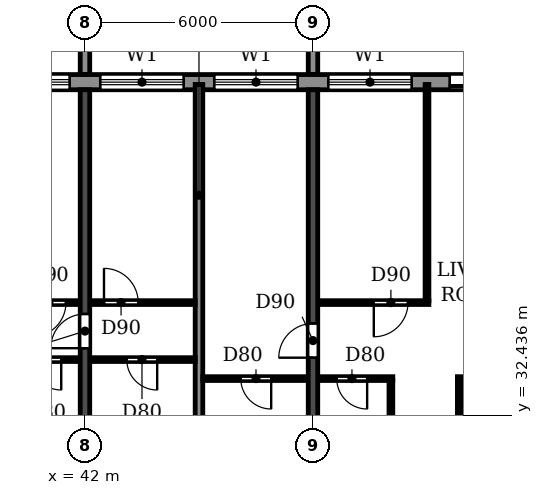
"""IFC4 building model, lengths in metres.
Left out: names, types, materials, properties, quantities, classifications, styles, units other than length and angle.
Written with IfcOpenShell. Run it as: python <this file> out.ifc"""

import sys

from ifc_helpers import new_model, si_unit, direction, frame, frame_2d, origin, place, context, subcontext, project, spatial, polyline, rectangle, outline, extrude, source, transform, mapped, element, fill, save


model = new_model("IFC4")
c1 = context("Model", 3, precision=1e-05, world=origin(), true_north=direction((0.0, 1.0)))
c2 = subcontext(c1, "Body", "Model", "MODEL_VIEW")
j1 = project(units=[si_unit("LENGTHUNIT", "METRE"), si_unit("PLANEANGLEUNIT", "RADIAN")], contexts=[c1])
p1 = place(None, origin())
s1 = spatial("IfcSite", under=j1, at=p1, CompositionType="ELEMENT")
p2 = place(p1, origin())
s2 = spatial("IfcBuilding", under=s1, at=p2, CompositionType="ELEMENT")
p3 = place(p2, frame((0.0, 0.0, 241.2)))
s3 = spatial("IfcBuildingStorey", under=s2, at=p3, CompositionType="ELEMENT", Elevation=241.2)
p4 = place(p3, frame((42.0, 30.5, 0.0), z_axis=(0.0, 0.0, 1.0), x_axis=(0.0, 1.0, 0.0)))
e1 = element("IfcWall", 1, at=p4, inside=s3, PredefinedType="SHEAR", context=c2, shape_type="SweptSolid", body=[
    extrude(rectangle(XDim=10.5, YDim=0.25, at=frame_2d((5.25, 0.0))), origin(), (0.0, 0.0, 1.0), 3.08),
])
p5 = place(p4, frame((3.7, 0.0, 0.0)))
e2 = element("IfcOpeningElement", 2, at=p5, cuts=e1, PredefinedType="OPENING", context=c2, shape_type="SweptSolid", body=[
    extrude(rectangle(XDim=0.9, YDim=2.1, at=frame_2d((0.45, 1.05))), frame((0.0, 0.135, 0.0), z_axis=(0.0, -1.0, 0.0), x_axis=(1.0, 0.0, 0.0)), (0.0, 0.0, 1.0), 0.27),
])
p6 = place(p3, frame((48.0, 30.5, 0.0), z_axis=(0.0, 0.0, 1.0), x_axis=(0.0, 1.0, 0.0)))
e3 = element("IfcWall", 3, at=p6, inside=s3, PredefinedType="SHEAR", context=c2, shape_type="SweptSolid", body=[
    extrude(rectangle(XDim=10.5, YDim=0.25, at=frame_2d((5.25, 0.0))), origin(), (0.0, 0.0, 1.0), 3.08),
])
p7 = place(p6, frame((3.45, 0.0, 0.0)))
e4 = element("IfcOpeningElement", 4, at=p7, cuts=e3, PredefinedType="OPENING", context=c2, shape_type="SweptSolid", body=[
    extrude(rectangle(XDim=0.9, YDim=2.1, at=frame_2d((0.45, 1.05))), frame((0.0, 0.135, 0.0), z_axis=(0.0, -1.0, 0.0), x_axis=(1.0, 0.0, 0.0)), (0.0, 0.0, 1.0), 0.27),
])
p8 = place(p3, frame((79.317, 41.2, 0.0), z_axis=(0.0, 0.0, 1.0), x_axis=(-1.0, 0.0, 0.0)))
e5 = element("IfcWall", 5, at=p8, inside=s3, PredefinedType="STANDARD", context=c2, shape_type="SweptSolid", body=[
    extrude(rectangle(XDim=56.634, YDim=0.4, at=frame_2d((28.317, 0.0))), origin(), (0.0, 0.0, 1.0), 3.08),
])
p9 = place(p8, frame((52.917, 0.0, 0.0)))
e6 = element("IfcOpeningElement", 6, at=p9, cuts=e5, PredefinedType="OPENING", context=c2, shape_type="SweptSolid", body=[
    extrude(rectangle(XDim=1.8, YDim=2.4, at=frame_2d((0.9, 1.2))), frame((0.0, 0.21, 0.0), z_axis=(0.0, -1.0, 0.0), x_axis=(1.0, 0.0, 0.0)), (0.0, 0.0, 1.0), 0.42),
])
p10 = place(p8, frame((49.717, 0.0, 0.9)))
e7 = element("IfcOpeningElement", 7, at=p10, cuts=e5, PredefinedType="OPENING", context=c2, shape_type="SweptSolid", body=[
    extrude(rectangle(XDim=2.2, YDim=1.5, at=frame_2d((1.1, 0.75))), frame((0.0, 0.21, 0.0), z_axis=(0.0, -1.0, 0.0), x_axis=(1.0, 0.0, 0.0)), (0.0, 0.0, 1.0), 0.42),
])
p11 = place(p8, frame((46.717, 0.0, 0.9)))
e8 = element("IfcOpeningElement", 8, at=p11, cuts=e5, PredefinedType="OPENING", context=c2, shape_type="SweptSolid", body=[
    extrude(rectangle(XDim=2.2, YDim=1.5, at=frame_2d((1.1, 0.75))), frame((0.0, 0.21, 0.0), z_axis=(0.0, -1.0, 0.0), x_axis=(1.0, 0.0, 0.0)), (0.0, 0.0, 1.0), 0.42),
])
p12 = place(p8, frame((43.717, 0.0, 0.9)))
e9 = element("IfcOpeningElement", 9, at=p12, cuts=e5, PredefinedType="OPENING", context=c2, shape_type="SweptSolid", body=[
    extrude(rectangle(XDim=2.2, YDim=1.5, at=frame_2d((1.1, 0.75))), frame((0.0, 0.21, 0.0), z_axis=(0.0, -1.0, 0.0), x_axis=(1.0, 0.0, 0.0)), (0.0, 0.0, 1.0), 0.42),
])
p13 = place(p8, frame((40.917, 0.0, 0.0)))
e10 = element("IfcOpeningElement", 10, at=p13, cuts=e5, PredefinedType="OPENING", context=c2, shape_type="SweptSolid", body=[
    extrude(rectangle(XDim=1.8, YDim=2.4, at=frame_2d((0.9, 1.2))), frame((0.0, 0.21, 0.0), z_axis=(0.0, -1.0, 0.0), x_axis=(1.0, 0.0, 0.0)), (0.0, 0.0, 1.0), 0.42),
])
p14 = place(p8, frame((37.717, 0.0, 0.9)))
e11 = element("IfcOpeningElement", 11, at=p14, cuts=e5, PredefinedType="OPENING", context=c2, shape_type="SweptSolid", body=[
    extrude(rectangle(XDim=2.2, YDim=1.5, at=frame_2d((1.1, 0.75))), frame((0.0, 0.21, 0.0), z_axis=(0.0, -1.0, 0.0), x_axis=(1.0, 0.0, 0.0)), (0.0, 0.0, 1.0), 0.42),
])
p15 = place(p8, frame((34.717, 0.0, 0.9)))
e12 = element("IfcOpeningElement", 12, at=p15, cuts=e5, PredefinedType="OPENING", context=c2, shape_type="SweptSolid", body=[
    extrude(rectangle(XDim=2.2, YDim=1.5, at=frame_2d((1.1, 0.75))), frame((0.0, 0.21, 0.0), z_axis=(0.0, -1.0, 0.0), x_axis=(1.0, 0.0, 0.0)), (0.0, 0.0, 1.0), 0.42),
])
p16 = place(p8, frame((31.717, 0.0, 0.9)))
e13 = element("IfcOpeningElement", 13, at=p16, cuts=e5, PredefinedType="OPENING", context=c2, shape_type="SweptSolid", body=[
    extrude(rectangle(XDim=2.2, YDim=1.5, at=frame_2d((1.1, 0.75))), frame((0.0, 0.21, 0.0), z_axis=(0.0, -1.0, 0.0), x_axis=(1.0, 0.0, 0.0)), (0.0, 0.0, 1.0), 0.42),
])
p17 = place(p8, frame((28.717, 0.0, 0.9)))
e14 = element("IfcOpeningElement", 14, at=p17, cuts=e5, PredefinedType="OPENING", context=c2, shape_type="SweptSolid", body=[
    extrude(rectangle(XDim=2.2, YDim=1.5, at=frame_2d((1.1, 0.75))), frame((0.0, 0.21, 0.0), z_axis=(0.0, -1.0, 0.0), x_axis=(1.0, 0.0, 0.0)), (0.0, 0.0, 1.0), 0.42),
])
p18 = place(p8, frame((25.917, 0.0, 0.0)))
e15 = element("IfcOpeningElement", 15, at=p18, cuts=e5, PredefinedType="OPENING", context=c2, shape_type="SweptSolid", body=[
    extrude(rectangle(XDim=1.8, YDim=2.4, at=frame_2d((0.9, 1.2))), frame((0.0, 0.21, 0.0), z_axis=(0.0, -1.0, 0.0), x_axis=(1.0, 0.0, 0.0)), (0.0, 0.0, 1.0), 0.42),
])
p19 = place(p8, frame((22.717, 0.0, 0.9)))
e16 = element("IfcOpeningElement", 16, at=p19, cuts=e5, PredefinedType="OPENING", context=c2, shape_type="SweptSolid", body=[
    extrude(rectangle(XDim=2.2, YDim=1.5, at=frame_2d((1.1, 0.75))), frame((0.0, 0.21, 0.0), z_axis=(0.0, -1.0, 0.0), x_axis=(1.0, 0.0, 0.0)), (0.0, 0.0, 1.0), 0.42),
])
p20 = place(p8, frame((19.717, 0.0, 0.9)))
e17 = element("IfcOpeningElement", 17, at=p20, cuts=e5, PredefinedType="OPENING", context=c2, shape_type="SweptSolid", body=[
    extrude(rectangle(XDim=2.2, YDim=1.5, at=frame_2d((1.1, 0.75))), frame((0.0, 0.21, 0.0), z_axis=(0.0, -1.0, 0.0), x_axis=(1.0, 0.0, 0.0)), (0.0, 0.0, 1.0), 0.42),
])
p21 = place(p8, frame((16.717, 0.0, 0.9)))
e18 = element("IfcOpeningElement", 18, at=p21, cuts=e5, PredefinedType="OPENING", context=c2, shape_type="SweptSolid", body=[
    extrude(rectangle(XDim=2.2, YDim=1.5, at=frame_2d((1.1, 0.75))), frame((0.0, 0.21, 0.0), z_axis=(0.0, -1.0, 0.0), x_axis=(1.0, 0.0, 0.0)), (0.0, 0.0, 1.0), 0.42),
])
p22 = place(p8, frame((13.917, 0.0, 0.0)))
e19 = element("IfcOpeningElement", 19, at=p22, cuts=e5, PredefinedType="OPENING", context=c2, shape_type="SweptSolid", body=[
    extrude(rectangle(XDim=1.8, YDim=2.4, at=frame_2d((0.9, 1.2))), frame((0.0, 0.21, 0.0), z_axis=(0.0, -1.0, 0.0), x_axis=(1.0, 0.0, 0.0)), (0.0, 0.0, 1.0), 0.42),
])
p23 = place(p8, frame((10.717, 0.0, 0.9)))
e20 = element("IfcOpeningElement", 20, at=p23, cuts=e5, PredefinedType="OPENING", context=c2, shape_type="SweptSolid", body=[
    extrude(rectangle(XDim=2.2, YDim=1.5, at=frame_2d((1.1, 0.75))), frame((0.0, 0.21, 0.0), z_axis=(0.0, -1.0, 0.0), x_axis=(1.0, 0.0, 0.0)), (0.0, 0.0, 1.0), 0.42),
])
p24 = place(p8, frame((7.917, 0.0, 0.0)))
e21 = element("IfcOpeningElement", 21, at=p24, cuts=e5, PredefinedType="OPENING", context=c2, shape_type="SweptSolid", body=[
    extrude(rectangle(XDim=1.8, YDim=2.4, at=frame_2d((0.9, 1.2))), frame((0.0, 0.21, 0.0), z_axis=(0.0, -1.0, 0.0), x_axis=(1.0, 0.0, 0.0)), (0.0, 0.0, 1.0), 0.42),
])
p25 = place(p8, frame((4.717, 0.0, 0.9)))
e22 = element("IfcOpeningElement", 22, at=p25, cuts=e5, PredefinedType="OPENING", context=c2, shape_type="SweptSolid", body=[
    extrude(rectangle(XDim=2.2, YDim=1.5, at=frame_2d((1.1, 0.75))), frame((0.0, 0.21, 0.0), z_axis=(0.0, -1.0, 0.0), x_axis=(1.0, 0.0, 0.0)), (0.0, 0.0, 1.0), 0.42),
])
p26 = place(p8, frame((1.917, 0.0, 0.0)))
e23 = element("IfcOpeningElement", 23, at=p26, cuts=e5, PredefinedType="OPENING", context=c2, shape_type="SweptSolid", body=[
    extrude(rectangle(XDim=1.8, YDim=2.4, at=frame_2d((0.9, 1.2))), frame((0.0, 0.21, 0.0), z_axis=(0.0, -1.0, 0.0), x_axis=(1.0, 0.0, 0.0)), (0.0, 0.0, 1.0), 0.42),
])
m1 = source(origin(), c2, "Body", "SweptSolid", [
    extrude(outline(polyline([(0.0, 0.0), (0.25, 0.0), (0.25, 3.1), (0.0, 3.1), (0.0, 0.0)])), origin(), (0.0, 0.0, 1.0), 3.1),
])
for number, where in (
    (24, (41.875, 41.4, 0.0)),
    (25, (47.875, 41.4, 0.0)),
):
    element("IfcWall", number, at=place(p3, frame(where)), inside=s3, PredefinedType="STANDARD", context=c2, shape_type="MappedRepresentation", body=[
        mapped(m1, transform((0.0, 0.0, 0.0))),
    ])
p27 = place(p3, frame((45.0, 30.51, 0.0), z_axis=(0.0, 0.0, 1.0), x_axis=(0.0, 1.0, 0.0)))
e26 = element("IfcWall", 26, at=p27, inside=s3, PredefinedType="PARTITIONING", context=c2, shape_type="SweptSolid", body=[
    extrude(rectangle(XDim=10.63, YDim=0.2, at=frame_2d((5.315, 0.0))), origin(), (0.0, 0.0, 1.0), 3.08),
])
p28 = place(p3, frame((45.1, 33.4, 0.0), z_axis=(0.0, 0.0, 1.0), x_axis=(1.0, 0.0, 0.0)))
e27 = element("IfcWall", 27, at=p28, inside=s3, PredefinedType="PARTITIONING", context=c2, shape_type="SweptSolid", body=[
    extrude(rectangle(XDim=2.765, YDim=0.1, at=frame_2d((1.382, 0.0))), origin(), (0.0, 0.0, 1.0), 3.08),
])
p29 = place(p28, frame((1.0, 0.0, 0.0)))
e28 = element("IfcOpeningElement", 28, at=p29, cuts=e27, PredefinedType="OPENING", context=c2, shape_type="SweptSolid", body=[
    extrude(rectangle(XDim=0.8, YDim=2.1, at=frame_2d((0.4, 1.05))), frame((0.0, 0.06, 0.0), z_axis=(0.0, -1.0, 0.0), x_axis=(1.0, 0.0, 0.0)), (0.0, 0.0, 1.0), 0.12),
])
p30 = place(p3, frame((48.135, 33.4, 0.0), z_axis=(0.0, 0.0, 1.0), x_axis=(1.0, 0.0, 0.0)))
e29 = element("IfcWall", 29, at=p30, inside=s3, PredefinedType="PARTITIONING", context=c2, shape_type="SweptSolid", body=[
    extrude(rectangle(XDim=1.965, YDim=0.1, at=frame_2d((0.982, 0.0))), origin(), (0.0, 0.0, 1.0), 3.08),
])
p31 = place(p30, frame((0.49, 0.0, 0.0)))
e30 = element("IfcOpeningElement", 30, at=p31, cuts=e29, PredefinedType="OPENING", context=c2, shape_type="SweptSolid", body=[
    extrude(rectangle(XDim=0.8, YDim=2.1, at=frame_2d((0.4, 1.05))), frame((0.0, 0.06, 0.0), z_axis=(0.0, -1.0, 0.0), x_axis=(1.0, 0.0, 0.0)), (0.0, 0.0, 1.0), 0.12),
])
p32 = place(p3, frame((51.8, 33.4, 0.0), z_axis=(0.0, 0.0, 1.0), x_axis=(1.0, 0.0, 0.0)))
e31 = element("IfcWall", 31, at=p32, inside=s3, PredefinedType="PARTITIONING", context=c2, shape_type="SweptSolid", body=[
    extrude(rectangle(XDim=2.065, YDim=0.1, at=frame_2d((1.032, 0.0))), origin(), (0.0, 0.0, 1.0), 3.08),
])
p33 = place(p32, frame((0.675, 0.0, 0.0)))
e32 = element("IfcOpeningElement", 32, at=p33, cuts=e31, PredefinedType="OPENING", context=c2, shape_type="SweptSolid", body=[
    extrude(rectangle(XDim=0.9, YDim=2.1, at=frame_2d((0.45, 1.05))), frame((0.0, 0.06, 0.0), z_axis=(0.0, -1.0, 0.0), x_axis=(1.0, 0.0, 0.0)), (0.0, 0.0, 1.0), 0.12),
])
p34 = place(p3, frame((39.9, 33.9, 0.0), z_axis=(0.0, 0.0, 1.0), x_axis=(1.0, 0.0, 0.0)))
e33 = element("IfcWall", 33, at=p34, inside=s3, PredefinedType="PARTITIONING", context=c2, shape_type="SweptSolid", body=[
    extrude(rectangle(XDim=1.965, YDim=0.1, at=frame_2d((0.982, 0.0))), origin(), (0.0, 0.0, 1.0), 3.08),
])
p35 = place(p34, frame((0.675, 0.0, 0.0)))
e34 = element("IfcOpeningElement", 34, at=p35, cuts=e33, PredefinedType="OPENING", context=c2, shape_type="SweptSolid", body=[
    extrude(rectangle(XDim=0.8, YDim=2.1, at=frame_2d((0.4, 1.05))), frame((0.0, 0.06, 0.0), z_axis=(0.0, -1.0, 0.0), x_axis=(1.0, 0.0, 0.0)), (0.0, 0.0, 1.0), 0.12),
])
p36 = place(p3, frame((42.135, 33.9, 0.0), z_axis=(0.0, 0.0, 1.0), x_axis=(1.0, 0.0, 0.0)))
e35 = element("IfcWall", 35, at=p36, inside=s3, PredefinedType="PARTITIONING", context=c2, shape_type="SweptSolid", body=[
    extrude(rectangle(XDim=2.765, YDim=0.1, at=frame_2d((1.382, 0.0))), origin(), (0.0, 0.0, 1.0), 3.08),
])
p37 = place(p36, frame((0.965, 0.0, 0.0)))
e36 = element("IfcOpeningElement", 36, at=p37, cuts=e35, PredefinedType="OPENING", context=c2, shape_type="SweptSolid", body=[
    extrude(rectangle(XDim=0.8, YDim=2.1, at=frame_2d((0.4, 1.05))), frame((0.0, 0.06, 0.0), z_axis=(0.0, -1.0, 0.0), x_axis=(1.0, 0.0, 0.0)), (0.0, 0.0, 1.0), 0.12),
])
p38 = place(p3, frame((38.95, 35.4, 0.0), z_axis=(0.0, 0.0, 1.0), x_axis=(1.0, 0.0, 0.0)))
e37 = element("IfcWall", 37, at=p38, inside=s3, PredefinedType="PARTITIONING", context=c2, shape_type="SweptSolid", body=[
    extrude(rectangle(XDim=2.915, YDim=0.1, at=frame_2d((1.458, 0.0))), origin(), (0.0, 0.0, 1.0), 3.08),
])
p39 = place(p38, frame((1.65, 0.0, 0.0)))
e38 = element("IfcOpeningElement", 38, at=p39, cuts=e37, PredefinedType="OPENING", context=c2, shape_type="SweptSolid", body=[
    extrude(rectangle(XDim=0.9, YDim=2.1, at=frame_2d((0.45, 1.05))), frame((0.0, 0.06, 0.0), z_axis=(0.0, -1.0, 0.0), x_axis=(1.0, 0.0, 0.0)), (0.0, 0.0, 1.0), 0.12),
])
p40 = place(p3, frame((42.135, 35.4, 0.0), z_axis=(0.0, 0.0, 1.0), x_axis=(1.0, 0.0, 0.0)))
e39 = element("IfcWall", 39, at=p40, inside=s3, PredefinedType="PARTITIONING", context=c2, shape_type="SweptSolid", body=[
    extrude(rectangle(XDim=2.765, YDim=0.1, at=frame_2d((1.382, 0.0))), origin(), (0.0, 0.0, 1.0), 3.08),
])
p41 = place(p40, frame((0.365, 0.0, 0.0)))
e40 = element("IfcOpeningElement", 40, at=p41, cuts=e39, PredefinedType="OPENING", context=c2, shape_type="SweptSolid", body=[
    extrude(rectangle(XDim=0.9, YDim=2.1, at=frame_2d((0.45, 1.05))), frame((0.0, 0.06, 0.0), z_axis=(0.0, -1.0, 0.0), x_axis=(1.0, 0.0, 0.0)), (0.0, 0.0, 1.0), 0.12),
])
p42 = place(p3, frame((48.135, 35.4, 0.0), z_axis=(0.0, 0.0, 1.0), x_axis=(1.0, 0.0, 0.0)))
e41 = element("IfcWall", 41, at=p42, inside=s3, PredefinedType="PARTITIONING", context=c2, shape_type="SweptSolid", body=[
    extrude(rectangle(XDim=2.915, YDim=0.1, at=frame_2d((1.458, 0.0))), origin(), (0.0, 0.0, 1.0), 3.08),
])
p43 = place(p42, frame((1.465, 0.0, 0.0)))
e42 = element("IfcOpeningElement", 42, at=p43, cuts=e41, PredefinedType="OPENING", context=c2, shape_type="SweptSolid", body=[
    extrude(rectangle(XDim=0.9, YDim=2.1, at=frame_2d((0.45, 1.05))), frame((0.0, 0.06, 0.0), z_axis=(0.0, -1.0, 0.0), x_axis=(1.0, 0.0, 0.0)), (0.0, 0.0, 1.0), 0.12),
])
p44 = place(p3, frame((50.05, 30.51, 0.0), z_axis=(0.0, 0.0, 1.0), x_axis=(0.0, 1.0, 0.0)))
e43 = element("IfcWall", 43, at=p44, inside=s3, PredefinedType="PARTITIONING", context=c2, shape_type="SweptSolid", body=[
    extrude(rectangle(XDim=2.84, YDim=0.1, at=frame_2d((1.42, 0.0))), origin(), (0.0, 0.0, 1.0), 3.08),
])
p45 = place(p3, frame((51.0, 35.45, 0.0), z_axis=(0.0, 0.0, 1.0), x_axis=(0.0, 1.0, 0.0)))
e44 = element("IfcWall", 44, at=p45, inside=s3, PredefinedType="PARTITIONING", context=c2, shape_type="SweptSolid", body=[
    extrude(rectangle(XDim=5.69, YDim=0.1, at=frame_2d((2.845, 0.0))), origin(), (0.0, 0.0, 1.0), 3.08),
])
p46 = place(p3, frame((51.85, 30.51, 0.0), z_axis=(0.0, 0.0, 1.0), x_axis=(0.0, 1.0, 0.0)))
e45 = element("IfcWall", 45, at=p46, inside=s3, PredefinedType="PARTITIONING", context=c2, shape_type="SweptSolid", body=[
    extrude(rectangle(XDim=2.84, YDim=0.1, at=frame_2d((1.42, 0.0))), origin(), (0.0, 0.0, 1.0), 3.08),
])
p47 = place(p14, origin())
e46 = element("IfcWindow", 46, at=p47, inside=s3, PartitioningType="DOUBLE_PANEL_HORIZONTAL", PredefinedType="WINDOW", context=c2, shape_type="SweptSolid", body=[
    extrude(rectangle(XDim=2.2, YDim=1.5, at=frame_2d((1.1, 0.75))), frame((0.0, 0.03, 0.0), z_axis=(0.0, -1.0, 0.0), x_axis=(1.0, 0.0, 0.0)), (0.0, 0.0, 1.0), 0.06),
])
fill(e11, e46)
p48 = place(p15, origin())
e47 = element("IfcWindow", 47, at=p48, inside=s3, PartitioningType="DOUBLE_PANEL_HORIZONTAL", PredefinedType="WINDOW", context=c2, shape_type="SweptSolid", body=[
    extrude(rectangle(XDim=2.2, YDim=1.5, at=frame_2d((1.1, 0.75))), frame((0.0, 0.03, 0.0), z_axis=(0.0, -1.0, 0.0), x_axis=(1.0, 0.0, 0.0)), (0.0, 0.0, 1.0), 0.06),
])
fill(e12, e47)
p49 = place(p16, origin())
e48 = element("IfcWindow", 48, at=p49, inside=s3, PartitioningType="DOUBLE_PANEL_HORIZONTAL", PredefinedType="WINDOW", context=c2, shape_type="SweptSolid", body=[
    extrude(rectangle(XDim=2.2, YDim=1.5, at=frame_2d((1.1, 0.75))), frame((0.0, 0.03, 0.0), z_axis=(0.0, -1.0, 0.0), x_axis=(1.0, 0.0, 0.0)), (0.0, 0.0, 1.0), 0.06),
])
fill(e13, e48)
p50 = place(p17, origin())
e49 = element("IfcWindow", 49, at=p50, inside=s3, PartitioningType="DOUBLE_PANEL_HORIZONTAL", PredefinedType="WINDOW", context=c2, shape_type="SweptSolid", body=[
    extrude(rectangle(XDim=2.2, YDim=1.5, at=frame_2d((1.1, 0.75))), frame((0.0, 0.03, 0.0), z_axis=(0.0, -1.0, 0.0), x_axis=(1.0, 0.0, 0.0)), (0.0, 0.0, 1.0), 0.06),
])
fill(e14, e49)
p51 = place(p18, origin())
e50 = element("IfcDoor", 50, at=p51, inside=s3, OperationType="DOUBLE_DOOR_SLIDING", PredefinedType="DOOR", context=c2, shape_type="SweptSolid", body=[
    extrude(rectangle(XDim=1.8, YDim=2.4, at=frame_2d((0.9, 1.2))), frame((0.0, 0.025, 0.0), z_axis=(0.0, -1.0, 0.0), x_axis=(1.0, 0.0, 0.0)), (0.0, 0.0, 1.0), 0.05),
])
fill(e15, e50)
p52 = place(p41, origin())
e51 = element("IfcDoor", 51, at=p52, inside=s3, OperationType="SINGLE_SWING_LEFT", PredefinedType="DOOR", context=c2, shape_type="SweptSolid", body=[
    extrude(rectangle(XDim=0.9, YDim=2.1, at=frame_2d((0.45, 1.05))), frame((0.0, 0.025, 0.0), z_axis=(0.0, -1.0, 0.0), x_axis=(1.0, 0.0, 0.0)), (0.0, 0.0, 1.0), 0.05),
])
fill(e40, e51)
p53 = place(p37, frame((0.8, 0.0, 0.0), z_axis=(0.0, 0.0, 1.0), x_axis=(-1.0, 0.0, 0.0)))
e52 = element("IfcDoor", 52, at=p53, inside=s3, OperationType="SINGLE_SWING_LEFT", PredefinedType="DOOR", context=c2, shape_type="SweptSolid", body=[
    extrude(rectangle(XDim=0.8, YDim=2.1, at=frame_2d((0.4, 1.05))), frame((0.0, 0.025, 0.0), z_axis=(0.0, -1.0, 0.0), x_axis=(1.0, 0.0, 0.0)), (0.0, 0.0, 1.0), 0.05),
])
fill(e36, e52)
p54 = place(p35, frame((0.8, 0.0, 0.0), z_axis=(0.0, 0.0, 1.0), x_axis=(-1.0, 0.0, 0.0)))
e53 = element("IfcDoor", 53, at=p54, inside=s3, OperationType="SINGLE_SWING_LEFT", PredefinedType="DOOR", context=c2, shape_type="SweptSolid", body=[
    extrude(rectangle(XDim=0.8, YDim=2.1, at=frame_2d((0.4, 1.05))), frame((0.0, 0.025, 0.0), z_axis=(0.0, -1.0, 0.0), x_axis=(1.0, 0.0, 0.0)), (0.0, 0.0, 1.0), 0.05),
])
fill(e34, e53)
p55 = place(p39, frame((0.9, 0.0, 0.0), z_axis=(0.0, 0.0, 1.0), x_axis=(-1.0, 0.0, 0.0)))
e54 = element("IfcDoor", 54, at=p55, inside=s3, OperationType="SINGLE_SWING_RIGHT", PredefinedType="DOOR", context=c2, shape_type="SweptSolid", body=[
    extrude(rectangle(XDim=0.9, YDim=2.1, at=frame_2d((0.45, 1.05))), frame((0.0, 0.025, 0.0), z_axis=(0.0, -1.0, 0.0), x_axis=(1.0, 0.0, 0.0)), (0.0, 0.0, 1.0), 0.05),
])
fill(e38, e54)
p56 = place(p5, origin())
e55 = element("IfcDoor", 55, at=p56, inside=s3, OperationType="SINGLE_SWING_LEFT", PredefinedType="DOOR", context=c2, shape_type="SweptSolid", body=[
    extrude(rectangle(XDim=0.9, YDim=2.1, at=frame_2d((0.45, 1.05))), frame((0.0, 0.025, 0.0), z_axis=(0.0, -1.0, 0.0), x_axis=(1.0, 0.0, 0.0)), (0.0, 0.0, 1.0), 0.05),
])
fill(e2, e55)
p57 = place(p29, frame((0.8, 0.0, 0.0), z_axis=(0.0, 0.0, 1.0), x_axis=(-1.0, 0.0, 0.0)))
e56 = element("IfcDoor", 56, at=p57, inside=s3, OperationType="SINGLE_SWING_LEFT", PredefinedType="DOOR", context=c2, shape_type="SweptSolid", body=[
    extrude(rectangle(XDim=0.8, YDim=2.1, at=frame_2d((0.4, 1.05))), frame((0.0, 0.025, 0.0), z_axis=(0.0, -1.0, 0.0), x_axis=(1.0, 0.0, 0.0)), (0.0, 0.0, 1.0), 0.05),
])
fill(e28, e56)
p58 = place(p7, origin())
e57 = element("IfcDoor", 57, at=p58, inside=s3, OperationType="SINGLE_SWING_LEFT", PredefinedType="DOOR", context=c2, shape_type="SweptSolid", body=[
    extrude(rectangle(XDim=0.9, YDim=2.1, at=frame_2d((0.45, 1.05))), frame((0.0, 0.025, 0.0), z_axis=(0.0, -1.0, 0.0), x_axis=(1.0, 0.0, 0.0)), (0.0, 0.0, 1.0), 0.05),
])
fill(e4, e57)
p59 = place(p31, frame((0.8, 0.0, 0.0), z_axis=(0.0, 0.0, 1.0), x_axis=(-1.0, 0.0, 0.0)))
e58 = element("IfcDoor", 58, at=p59, inside=s3, OperationType="SINGLE_SWING_LEFT", PredefinedType="DOOR", context=c2, shape_type="SweptSolid", body=[
    extrude(rectangle(XDim=0.8, YDim=2.1, at=frame_2d((0.4, 1.05))), frame((0.0, 0.025, 0.0), z_axis=(0.0, -1.0, 0.0), x_axis=(1.0, 0.0, 0.0)), (0.0, 0.0, 1.0), 0.05),
])
fill(e30, e58)
p60 = place(p43, frame((0.9, 0.0, 0.0), z_axis=(0.0, 0.0, 1.0), x_axis=(-1.0, 0.0, 0.0)))
e59 = element("IfcDoor", 59, at=p60, inside=s3, OperationType="SINGLE_SWING_RIGHT", PredefinedType="DOOR", context=c2, shape_type="SweptSolid", body=[
    extrude(rectangle(XDim=0.9, YDim=2.1, at=frame_2d((0.45, 1.05))), frame((0.0, 0.025, 0.0), z_axis=(0.0, -1.0, 0.0), x_axis=(1.0, 0.0, 0.0)), (0.0, 0.0, 1.0), 0.05),
])
fill(e42, e59)
save(model, sys.argv[1])
